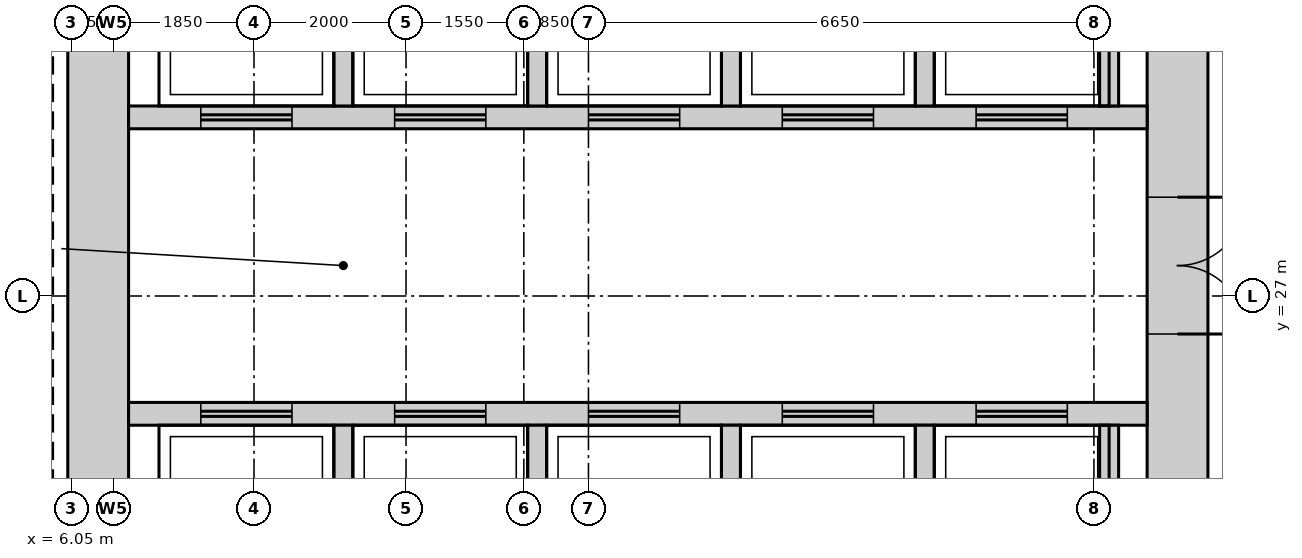
"""IFC4 building model, lengths in metres.
Left out: names, types, materials, properties, quantities, classifications, styles, units other than length and angle.
Written with IfcOpenShell. Run it as: python <this file> out.ifc"""

import sys

from ifc_helpers import new_model, si_unit, direction, frame, frame_2d, origin, place, context, subcontext, project, spatial, rectangle, extrude, source, transform, mapped, element, fill, save


model = new_model("IFC4")
c1 = context("Model", 3, precision=1e-05, world=origin(), true_north=direction((0.0, 1.0)))
c2 = subcontext(c1, "Body", "Model", "MODEL_VIEW")
j1 = project(units=[si_unit("LENGTHUNIT", "METRE"), si_unit("PLANEANGLEUNIT", "RADIAN")], contexts=[c1])
p1 = place(None, origin())
s1 = spatial("IfcSite", under=j1, at=p1, CompositionType="ELEMENT")
p2 = place(p1, origin())
s2 = spatial("IfcBuilding", under=s1, at=p2, CompositionType="ELEMENT")
p3 = place(p2, frame((0.0, 0.0, 180.7)))
s3 = spatial("IfcBuildingStorey", under=s2, at=p3, CompositionType="ELEMENT", Elevation=180.7)
m1 = source(origin(), c2, "Body", "SweptSolid", [
    extrude(rectangle(XDim=22.4, YDim=0.8, at=frame_2d((11.2, 0.0))), origin(), (0.0, 0.0, 1.0), 3.75),
])
p4 = place(p3, frame((20.6, 15.8, 0.0), z_axis=(0.0, 0.0, 1.0), x_axis=(0.0, 1.0, 0.0)))
e1 = element("IfcWall", 1, at=p4, inside=s3, PredefinedType="SHEAR", context=c2, shape_type="MappedRepresentation", body=[
    mapped(m1, transform((0.0, 0.0, 0.0))),
])
m2 = source(origin(), c2, "Body", "SweptSolid", [
    extrude(rectangle(XDim=1.8, YDim=2.1, at=frame_2d((0.9, 1.05))), frame((0.0, 0.41, 0.0), z_axis=(0.0, -1.0, 0.0), x_axis=(1.0, 0.0, 0.0)), (0.0, 0.0, 1.0), 0.82),
])
p5 = place(p4, frame((10.7, 0.0, 0.0)))
e2 = element("IfcOpeningElement", 2, at=p5, cuts=e1, PredefinedType="OPENING", context=c2, shape_type="MappedRepresentation", body=[
    mapped(m2, transform((0.0, 0.0, 0.0))),
])
m3 = source(origin(), c2, "Body", "SweptSolid", [
    extrude(rectangle(XDim=0.9, YDim=2.1, at=frame_2d((0.45, 1.05))), frame((0.0, 0.41, 0.0), z_axis=(0.0, -1.0, 0.0), x_axis=(1.0, 0.0, 0.0)), (0.0, 0.0, 1.0), 0.82),
])
p6 = place(p4, frame((0.35, 0.0, 0.0)))
e3 = element("IfcOpeningElement", 3, at=p6, cuts=e1, PredefinedType="OPENING", context=c2, shape_type="MappedRepresentation", body=[
    mapped(m3, transform((0.0, 0.0, 0.0))),
])
p7 = place(p4, frame((3.9, 0.0, 0.0)))
e4 = element("IfcOpeningElement", 4, at=p7, cuts=e1, PredefinedType="OPENING", context=c2, shape_type="MappedRepresentation", body=[
    mapped(m3, transform((0.0, 0.0, 0.0))),
])
p8 = place(p3, frame((6.4, 15.8, 0.0), z_axis=(0.0, 0.0, 1.0), x_axis=(0.0, 1.0, 0.0)))
e5 = element("IfcWall", 5, at=p8, inside=s3, PredefinedType="SHEAR", context=c2, shape_type="MappedRepresentation", body=[
    mapped(m1, transform((0.0, 0.0, 0.0))),
])
m4 = source(origin(), c2, "Body", "SweptSolid", [
    extrude(rectangle(XDim=13.4, YDim=0.3, at=frame_2d((6.7, 0.0))), origin(), (0.0, 0.0, 1.0), 3.75),
])
p9 = place(p3, frame((6.8, 29.35, 0.0), z_axis=(0.0, 0.0, 1.0), x_axis=(1.0, 0.0, 0.0)))
e6 = element("IfcWall", 6, at=p9, inside=s3, PredefinedType="STANDARD", context=c2, shape_type="MappedRepresentation", body=[
    mapped(m4, transform((0.0, 0.0, 0.0))),
])
m5 = source(origin(), c2, "Body", "SweptSolid", [
    extrude(rectangle(XDim=1.2, YDim=2.1, at=frame_2d((0.6, 1.05))), frame((0.0, 0.16, 0.0), z_axis=(0.0, -1.0, 0.0), x_axis=(1.0, 0.0, 0.0)), (0.0, 0.0, 1.0), 0.32),
])
p10 = place(p9, frame((0.95, 0.0, 0.0)))
e7 = element("IfcOpeningElement", 7, at=p10, cuts=e6, PredefinedType="OPENING", context=c2, shape_type="MappedRepresentation", body=[
    mapped(m5, transform((0.0, 0.0, 0.0))),
])
p11 = place(p9, frame((3.5, 0.0, 0.0)))
e8 = element("IfcOpeningElement", 8, at=p11, cuts=e6, PredefinedType="OPENING", context=c2, shape_type="MappedRepresentation", body=[
    mapped(m5, transform((0.0, 0.0, 0.0))),
])
p12 = place(p9, frame((6.05, 0.0, 0.0)))
e9 = element("IfcOpeningElement", 9, at=p12, cuts=e6, PredefinedType="OPENING", context=c2, shape_type="MappedRepresentation", body=[
    mapped(m5, transform((0.0, 0.0, 0.0))),
])
p13 = place(p9, frame((8.6, 0.0, 0.0)))
e10 = element("IfcOpeningElement", 10, at=p13, cuts=e6, PredefinedType="OPENING", context=c2, shape_type="MappedRepresentation", body=[
    mapped(m5, transform((0.0, 0.0, 0.0))),
])
p14 = place(p9, frame((11.15, 0.0, 0.0)))
e11 = element("IfcOpeningElement", 11, at=p14, cuts=e6, PredefinedType="OPENING", context=c2, shape_type="MappedRepresentation", body=[
    mapped(m5, transform((0.0, 0.0, 0.0))),
])
p15 = place(p3, frame((6.8, 25.45, 0.0), z_axis=(0.0, 0.0, 1.0), x_axis=(1.0, 0.0, 0.0)))
e12 = element("IfcWall", 12, at=p15, inside=s3, PredefinedType="STANDARD", context=c2, shape_type="MappedRepresentation", body=[
    mapped(m4, transform((0.0, 0.0, 0.0))),
])
p16 = place(p15, frame((0.95, 0.0, 0.0)))
e13 = element("IfcOpeningElement", 13, at=p16, cuts=e12, PredefinedType="OPENING", context=c2, shape_type="MappedRepresentation", body=[
    mapped(m5, transform((0.0, 0.0, 0.0))),
])
p17 = place(p15, frame((3.5, 0.0, 0.0)))
e14 = element("IfcOpeningElement", 14, at=p17, cuts=e12, PredefinedType="OPENING", context=c2, shape_type="MappedRepresentation", body=[
    mapped(m5, transform((0.0, 0.0, 0.0))),
])
p18 = place(p15, frame((6.05, 0.0, 0.0)))
e15 = element("IfcOpeningElement", 15, at=p18, cuts=e12, PredefinedType="OPENING", context=c2, shape_type="MappedRepresentation", body=[
    mapped(m5, transform((0.0, 0.0, 0.0))),
])
p19 = place(p15, frame((8.6, 0.0, 0.0)))
e16 = element("IfcOpeningElement", 16, at=p19, cuts=e12, PredefinedType="OPENING", context=c2, shape_type="MappedRepresentation", body=[
    mapped(m5, transform((0.0, 0.0, 0.0))),
])
p20 = place(p15, frame((11.15, 0.0, 0.0)))
e17 = element("IfcOpeningElement", 17, at=p20, cuts=e12, PredefinedType="OPENING", context=c2, shape_type="MappedRepresentation", body=[
    mapped(m5, transform((0.0, 0.0, 0.0))),
])
m6 = source(origin(), c2, "Body", "SweptSolid", [
    extrude(rectangle(XDim=2.4, YDim=0.25, at=frame_2d((1.2, 0.0))), origin(), (0.0, 0.0, 1.0), 3.75),
])
for number, where, z_axis, x_axis in (
    (18, (17.275, 29.5, 0.0), (0.0, 0.0, 1.0), (0.0, 1.0, 0.0)),
    (19, (19.7, 29.5, 0.0), (0.0, 0.0, 1.0), (0.0, 1.0, 0.0)),
    (20, (9.625, 29.5, 0.0), (0.0, 0.0, 1.0), (0.0, 1.0, 0.0)),
    (21, (12.175, 29.5, 0.0), (0.0, 0.0, 1.0), (0.0, 1.0, 0.0)),
    (22, (14.725, 29.5, 0.0), (0.0, 0.0, 1.0), (0.0, 1.0, 0.0)),
):
    element("IfcWall", number, at=place(p3, frame(where, z_axis=z_axis, x_axis=x_axis)), inside=s3, PredefinedType="STANDARD", context=c2, shape_type="MappedRepresentation", body=[
        mapped(m6, transform((0.0, 0.0, 0.0))),
    ])
m7 = source(origin(), c2, "Body", "SweptSolid", [
    extrude(rectangle(XDim=2.4, YDim=0.25, at=frame_2d((1.2, 0.0))), origin(), (0.0, 0.0, 1.0), 3.75),
])
for number, where, z_axis, x_axis in (
    (23, (17.275, 22.9, 0.0), (0.0, 0.0, 1.0), (0.0, 1.0, 0.0)),
    (24, (19.7, 22.9, 0.0), (0.0, 0.0, 1.0), (0.0, 1.0, 0.0)),
    (25, (9.625, 22.9, 0.0), (0.0, 0.0, 1.0), (0.0, 1.0, 0.0)),
    (26, (12.175, 22.9, 0.0), (0.0, 0.0, 1.0), (0.0, 1.0, 0.0)),
    (27, (14.725, 22.9, 0.0), (0.0, 0.0, 1.0), (0.0, 1.0, 0.0)),
):
    element("IfcWall", number, at=place(p3, frame(where, z_axis=z_axis, x_axis=x_axis)), inside=s3, PredefinedType="STANDARD", context=c2, shape_type="MappedRepresentation", body=[
        mapped(m7, transform((0.0, 0.0, 0.0))),
    ])
m8 = source(origin(), c2, "Body", "SweptSolid", [
    extrude(rectangle(XDim=1.8, YDim=2.1, at=frame_2d((0.9, 1.05))), frame((0.0, 0.35, 0.0), z_axis=(0.0, -1.0, 0.0), x_axis=(1.0, 0.0, 0.0)), (0.0, 0.0, 1.0), 0.7),
])
p21 = place(p5, origin())
e28 = element("IfcDoor", 28, at=p21, inside=s3, OperationType="DOUBLE_DOOR_SINGLE_SWING", PredefinedType="DOOR", context=c2, shape_type="MappedRepresentation", body=[
    mapped(m8, transform((0.0, 0.0, 0.0))),
])
fill(e2, e28)
m9 = source(origin(), c2, "Body", "SweptSolid", [
    extrude(rectangle(XDim=1.2, YDim=2.1, at=frame_2d((0.6, 1.05))), frame((0.0, 0.025, 0.0), z_axis=(0.0, -1.0, 0.0), x_axis=(1.0, 0.0, 0.0)), (0.0, 0.0, 1.0), 0.05),
])
p22 = place(p16, origin())
e29 = element("IfcDoor", 29, at=p22, inside=s3, OperationType="DOUBLE_DOOR_SLIDING", PredefinedType="DOOR", context=c2, shape_type="MappedRepresentation", body=[
    mapped(m9, transform((0.0, 0.0, 0.0))),
])
fill(e13, e29)
p23 = place(p17, origin())
e30 = element("IfcDoor", 30, at=p23, inside=s3, OperationType="DOUBLE_DOOR_SLIDING", PredefinedType="DOOR", context=c2, shape_type="MappedRepresentation", body=[
    mapped(m9, transform((0.0, 0.0, 0.0))),
])
fill(e14, e30)
p24 = place(p18, origin())
e31 = element("IfcDoor", 31, at=p24, inside=s3, OperationType="DOUBLE_DOOR_SLIDING", PredefinedType="DOOR", context=c2, shape_type="MappedRepresentation", body=[
    mapped(m9, transform((0.0, 0.0, 0.0))),
])
fill(e15, e31)
p25 = place(p19, origin())
e32 = element("IfcDoor", 32, at=p25, inside=s3, OperationType="DOUBLE_DOOR_SLIDING", PredefinedType="DOOR", context=c2, shape_type="MappedRepresentation", body=[
    mapped(m9, transform((0.0, 0.0, 0.0))),
])
fill(e16, e32)
p26 = place(p20, origin())
e33 = element("IfcDoor", 33, at=p26, inside=s3, OperationType="DOUBLE_DOOR_SLIDING", PredefinedType="DOOR", context=c2, shape_type="MappedRepresentation", body=[
    mapped(m9, transform((0.0, 0.0, 0.0))),
])
fill(e17, e33)
p27 = place(p10, origin())
e34 = element("IfcDoor", 34, at=p27, inside=s3, OperationType="DOUBLE_DOOR_SLIDING", PredefinedType="DOOR", context=c2, shape_type="MappedRepresentation", body=[
    mapped(m9, transform((0.0, 0.0, 0.0))),
])
fill(e7, e34)
p28 = place(p11, origin())
e35 = element("IfcDoor", 35, at=p28, inside=s3, OperationType="DOUBLE_DOOR_SLIDING", PredefinedType="DOOR", context=c2, shape_type="MappedRepresentation", body=[
    mapped(m9, transform((0.0, 0.0, 0.0))),
])
fill(e8, e35)
p29 = place(p12, origin())
e36 = element("IfcDoor", 36, at=p29, inside=s3, OperationType="DOUBLE_DOOR_SLIDING", PredefinedType="DOOR", context=c2, shape_type="MappedRepresentation", body=[
    mapped(m9, transform((0.0, 0.0, 0.0))),
])
fill(e9, e36)
p30 = place(p13, origin())
e37 = element("IfcDoor", 37, at=p30, inside=s3, OperationType="DOUBLE_DOOR_SLIDING", PredefinedType="DOOR", context=c2, shape_type="MappedRepresentation", body=[
    mapped(m9, transform((0.0, 0.0, 0.0))),
])
fill(e10, e37)
p31 = place(p14, origin())
e38 = element("IfcDoor", 38, at=p31, inside=s3, OperationType="DOUBLE_DOOR_SLIDING", PredefinedType="DOOR", context=c2, shape_type="MappedRepresentation", body=[
    mapped(m9, transform((0.0, 0.0, 0.0))),
])
fill(e11, e38)
save(model, sys.argv[1])
